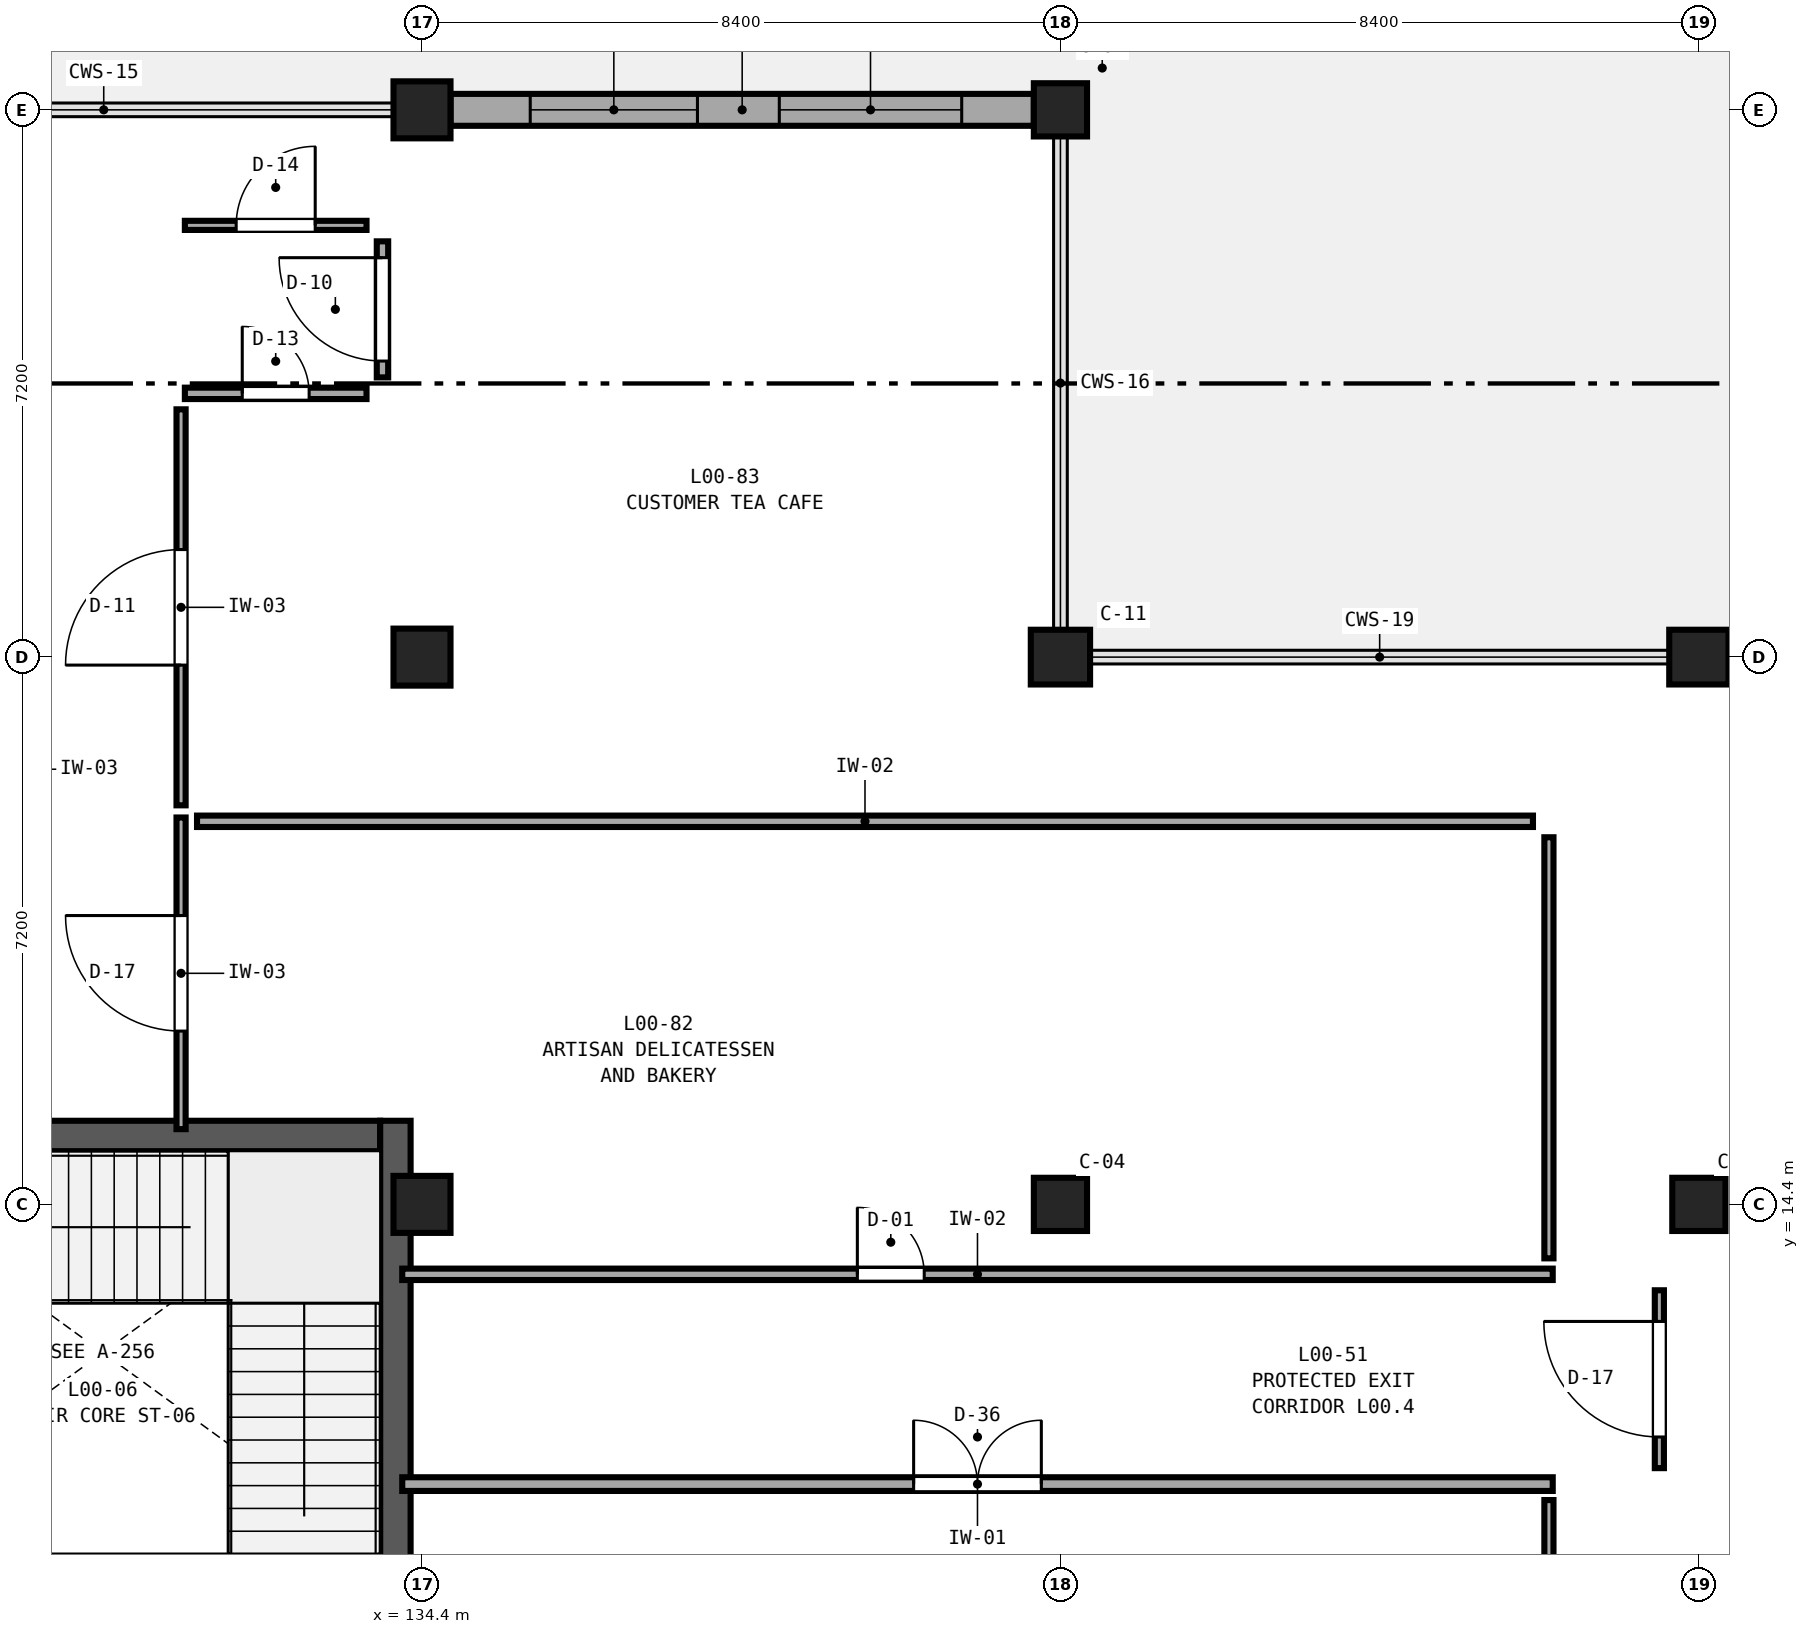
"""IFC4 building model, lengths in metres.
Left out: names, types, materials, properties, quantities, classifications, styles, units other than length and angle.
Written with IfcOpenShell. Run it as: python <this file> out.ifc"""

import sys

from ifc_helpers import new_model, si_unit, direction, frame, frame_2d, origin, origin_2d, place, context, subcontext, project, spatial, rectangle, extrude, element, fill, save


model = new_model("IFC4")
c1 = context("Model", 3, precision=1e-05, world=origin(), true_north=direction((0.0, 1.0)))
c2 = subcontext(c1, "Body", "Model", "MODEL_VIEW")
j1 = project(units=[si_unit("LENGTHUNIT", "METRE"), si_unit("PLANEANGLEUNIT", "RADIAN")], contexts=[c1])
p1 = place(None, origin())
s1 = spatial("IfcSite", under=j1, at=p1, CompositionType="ELEMENT")
p2 = place(p1, origin())
s2 = spatial("IfcBuilding", under=s1, at=p2, CompositionType="ELEMENT")
p3 = place(p2, origin())
s3 = spatial("IfcBuildingStorey", under=s2, at=p3, CompositionType="ELEMENT", Elevation=0.0)
for number, where, z_axis, x_axis in (
    (1, (134.4, 14.4, 0.0), (0.0, 0.0, 1.0), (1.0, 0.0, 0.0)),
    (2, (134.4, 21.6, 0.0), (0.0, 0.0, 1.0), (1.0, 0.0, 0.0)),
    (3, (134.4, 28.8, 0.0), (0.0, 0.0, 1.0), (1.0, 0.0, 0.0)),
):
    element("IfcColumn", number, at=place(p3, frame(where, z_axis=z_axis, x_axis=x_axis)), inside=s3, PredefinedType="COLUMN", context=c2, shape_type="SweptSolid", body=[
        extrude(rectangle(XDim=0.75, YDim=0.75, at=origin_2d()), origin(), (0.0, 0.0, 1.0), 5.4),
    ])
p4 = place(p3, frame((142.8, 14.4, 0.0), z_axis=(0.0, 0.0, 1.0), x_axis=(1.0, 0.0, 0.0)))
e4 = element("IfcColumn", 4, at=p4, inside=s3, PredefinedType="COLUMN", context=c2, shape_type="SweptSolid", body=[
    extrude(rectangle(XDim=0.7, YDim=0.7, at=origin_2d()), origin(), (0.0, 0.0, 1.0), 5.4),
])
p5 = place(p3, frame((142.8, 21.6, 0.0), z_axis=(0.0, 0.0, 1.0), x_axis=(1.0, 0.0, 0.0)))
e5 = element("IfcColumn", 5, at=p5, inside=s3, PredefinedType="PILASTER", context=c2, shape_type="SweptSolid", body=[
    extrude(rectangle(XDim=0.78, YDim=0.72, at=origin_2d()), origin(), (0.0, 0.0, 1.0), 5.4),
])
for number, where, z_axis, x_axis in (
    (6, (142.8, 28.8, 0.0), (0.0, 0.0, 1.0), (1.0, 0.0, 0.0)),
    (7, (151.2, 14.4, 0.0), (0.0, 0.0, 1.0), (1.0, 0.0, 0.0)),
):
    element("IfcColumn", number, at=place(p3, frame(where, z_axis=z_axis, x_axis=x_axis)), inside=s3, PredefinedType="COLUMN", context=c2, shape_type="SweptSolid", body=[
        extrude(rectangle(XDim=0.7, YDim=0.7, at=origin_2d()), origin(), (0.0, 0.0, 1.0), 5.4),
    ])
p6 = place(p3, frame((151.2, 21.6, 0.0), z_axis=(0.0, 0.0, 1.0), x_axis=(1.0, 0.0, 0.0)))
e8 = element("IfcColumn", 8, at=p6, inside=s3, PredefinedType="PILASTER", context=c2, shape_type="SweptSolid", body=[
    extrude(rectangle(XDim=0.78, YDim=0.72, at=origin_2d()), origin(), (0.0, 0.0, 1.0), 5.4),
])
p7 = place(p3, frame((134.775, 28.8, 0.0), z_axis=(0.0, 0.0, 1.0), x_axis=(1.0, 0.0, 0.0)))
e9 = element("IfcWall", 9, at=p7, inside=s3, PredefinedType="SOLIDWALL", context=c2, shape_type="SweptSolid", body=[
    extrude(rectangle(XDim=7.675, YDim=0.42, at=frame_2d((3.837, 0.0))), origin(), (0.0, 0.0, 1.0), 4.53),
])
p8 = place(p7, frame((1.049, 0.0, 0.75)))
e10 = element("IfcOpeningElement", 10, at=p8, cuts=e9, PredefinedType="OPENING", context=c2, shape_type="SweptSolid", body=[
    extrude(rectangle(XDim=2.2, YDim=2.8, at=frame_2d((1.1, 1.4))), frame((0.0, 0.23, 0.0), z_axis=(0.0, -1.0, 0.0), x_axis=(1.0, 0.0, 0.0)), (0.0, 0.0, 1.0), 0.46),
])
p9 = place(p7, frame((4.326, 0.0, 0.75)))
e11 = element("IfcOpeningElement", 11, at=p9, cuts=e9, PredefinedType="OPENING", context=c2, shape_type="SweptSolid", body=[
    extrude(rectangle(XDim=2.4, YDim=2.8, at=frame_2d((1.2, 1.4))), frame((0.0, 0.23, 0.0), z_axis=(0.0, -1.0, 0.0), x_axis=(1.0, 0.0, 0.0)), (0.0, 0.0, 1.0), 0.46),
])
p10 = place(p3, frame((126.55, 15.3, 0.0), z_axis=(0.0, 0.0, 1.0), x_axis=(1.0, 0.0, 0.0)))
e12 = element("IfcWall", 12, at=p10, inside=s3, PredefinedType="SHEAR", context=c2, shape_type="SweptSolid", body=[
    extrude(rectangle(XDim=7.3, YDim=0.4, at=frame_2d((3.65, 0.0))), origin(), (0.0, 0.0, 1.0), 5.4),
])
p11 = place(p3, frame((134.05, 7.25, 0.0), z_axis=(0.0, 0.0, 1.0), x_axis=(0.0, 1.0, 0.0)))
e13 = element("IfcWall", 13, at=p11, inside=s3, PredefinedType="SHEAR", context=c2, shape_type="SweptSolid", body=[
    extrude(rectangle(XDim=8.25, YDim=0.4, at=frame_2d((4.125, 0.0))), origin(), (0.0, 0.0, 1.0), 5.4),
])
p12 = place(p3, frame((134.14, 10.72, 0.0), z_axis=(0.0, 0.0, 1.0), x_axis=(1.0, 0.0, 0.0)))
e14 = element("IfcWall", 14, at=p12, inside=s3, PredefinedType="PARTITIONING", context=c2, shape_type="SweptSolid", body=[
    extrude(rectangle(XDim=15.137, YDim=0.18, at=frame_2d((7.569, 0.0))), origin(), (0.0, 0.0, 1.0), 5.08),
])
p13 = place(p12, frame((6.729, 0.0, 0.0)))
e15 = element("IfcOpeningElement", 15, at=p13, cuts=e14, PredefinedType="OPENING", context=c2, shape_type="SweptSolid", body=[
    extrude(rectangle(XDim=1.68, YDim=2.45, at=frame_2d((0.84, 1.225))), frame((0.0, 0.11, 0.0), z_axis=(0.0, -1.0, 0.0), x_axis=(1.0, 0.0, 0.0)), (0.0, 0.0, 1.0), 0.22),
])
p14 = place(p3, frame((134.14, 13.48, 0.0), z_axis=(0.0, 0.0, 1.0), x_axis=(1.0, 0.0, 0.0)))
e16 = element("IfcWall", 16, at=p14, inside=s3, PredefinedType="PARTITIONING", context=c2, shape_type="SweptSolid", body=[
    extrude(rectangle(XDim=15.137, YDim=0.15, at=frame_2d((7.569, 0.0))), origin(), (0.0, 0.0, 1.0), 5.08),
])
p15 = place(p14, frame((5.988, 0.0, 0.0)))
e17 = element("IfcOpeningElement", 17, at=p15, cuts=e16, PredefinedType="OPENING", context=c2, shape_type="SweptSolid", body=[
    extrude(rectangle(XDim=0.88, YDim=2.05, at=frame_2d((0.44, 1.025))), frame((0.0, 0.095, 0.0), z_axis=(0.0, -1.0, 0.0), x_axis=(1.0, 0.0, 0.0)), (0.0, 0.0, 1.0), 0.19),
])
p16 = place(p3, frame((131.23, 19.65, 0.0), z_axis=(0.0, 0.0, 1.0), x_axis=(0.0, 1.0, 0.0)))
e18 = element("IfcWall", 18, at=p16, inside=s3, PredefinedType="PARTITIONING", context=c2, shape_type="SweptSolid", body=[
    extrude(rectangle(XDim=5.21, YDim=0.12, at=frame_2d((2.605, 0.0))), origin(), (0.0, 0.0, 1.0), 5.08),
])
p17 = place(p16, frame((1.845, 0.0, 0.0)))
e19 = element("IfcOpeningElement", 19, at=p17, cuts=e18, PredefinedType="OPENING", context=c2, shape_type="SweptSolid", body=[
    extrude(rectangle(XDim=1.52, YDim=2.13, at=frame_2d((0.76, 1.065))), frame((0.0, 0.08, 0.0), z_axis=(0.0, -1.0, 0.0), x_axis=(1.0, 0.0, 0.0)), (0.0, 0.0, 1.0), 0.16),
])
p18 = place(p3, frame((131.23, 15.39, 0.0), z_axis=(0.0, 0.0, 1.0), x_axis=(0.0, 1.0, 0.0)))
e20 = element("IfcWall", 20, at=p18, inside=s3, PredefinedType="PARTITIONING", context=c2, shape_type="SweptSolid", body=[
    extrude(rectangle(XDim=4.1, YDim=0.12, at=frame_2d((2.05, 0.0))), origin(), (0.0, 0.0, 1.0), 5.08),
])
p19 = place(p18, frame((1.29, 0.0, 0.0)))
e21 = element("IfcOpeningElement", 21, at=p19, cuts=e20, PredefinedType="OPENING", context=c2, shape_type="SweptSolid", body=[
    extrude(rectangle(XDim=1.52, YDim=2.21, at=frame_2d((0.76, 1.105))), frame((0.0, 0.08, 0.0), z_axis=(0.0, -1.0, 0.0), x_axis=(1.0, 0.0, 0.0)), (0.0, 0.0, 1.0), 0.16),
])
p20 = place(p3, frame((131.28, 25.07, 0.0), z_axis=(0.0, 0.0, 1.0), x_axis=(1.0, 0.0, 0.0)))
e22 = element("IfcWall", 22, at=p20, inside=s3, PredefinedType="PARTITIONING", context=c2, shape_type="SweptSolid", body=[
    extrude(rectangle(XDim=2.39, YDim=0.15, at=frame_2d((1.195, 0.0))), origin(), (0.0, 0.0, 1.0), 5.08),
])
p21 = place(p20, frame((0.755, 0.0, 0.0)))
e23 = element("IfcOpeningElement", 23, at=p21, cuts=e22, PredefinedType="OPENING", context=c2, shape_type="SweptSolid", body=[
    extrude(rectangle(XDim=0.88, YDim=2.21, at=frame_2d((0.44, 1.105))), frame((0.0, 0.095, 0.0), z_axis=(0.0, -1.0, 0.0), x_axis=(1.0, 0.0, 0.0)), (0.0, 0.0, 1.0), 0.19),
])
p22 = place(p3, frame((131.28, 27.28, 0.0), z_axis=(0.0, 0.0, 1.0), x_axis=(1.0, 0.0, 0.0)))
e24 = element("IfcWall", 24, at=p22, inside=s3, PredefinedType="PARTITIONING", context=c2, shape_type="SweptSolid", body=[
    extrude(rectangle(XDim=2.39, YDim=0.12, at=frame_2d((1.195, 0.0))), origin(), (0.0, 0.0, 1.0), 5.08),
])
p23 = place(p22, frame((0.675, 0.0, 0.0)))
e25 = element("IfcOpeningElement", 25, at=p23, cuts=e24, PredefinedType="OPENING", context=c2, shape_type="SweptSolid", body=[
    extrude(rectangle(XDim=1.04, YDim=2.21, at=frame_2d((0.52, 1.105))), frame((0.0, 0.08, 0.0), z_axis=(0.0, -1.0, 0.0), x_axis=(1.0, 0.0, 0.0)), (0.0, 0.0, 1.0), 0.16),
])
p24 = place(p3, frame((150.68, 10.93, 0.0), z_axis=(0.0, 0.0, 1.0), x_axis=(0.0, 1.0, 0.0)))
e26 = element("IfcWall", 26, at=p24, inside=s3, PredefinedType="PARTITIONING", context=c2, shape_type="SweptSolid", body=[
    extrude(rectangle(XDim=2.34, YDim=0.12, at=frame_2d((1.17, 0.0))), origin(), (0.0, 0.0, 1.0), 4.58),
])
p25 = place(p24, frame((0.41, 0.0, 0.0)))
e27 = element("IfcOpeningElement", 27, at=p25, cuts=e26, PredefinedType="OPENING", context=c2, shape_type="SweptSolid", body=[
    extrude(rectangle(XDim=1.52, YDim=2.21, at=frame_2d((0.76, 1.105))), frame((0.0, 0.08, 0.0), z_axis=(0.0, -1.0, 0.0), x_axis=(1.0, 0.0, 0.0)), (0.0, 0.0, 1.0), 0.16),
])
p26 = place(p3, frame((133.88, 25.28, 0.0), z_axis=(0.0, 0.0, 1.0), x_axis=(0.0, 1.0, 0.0)))
e28 = element("IfcWall", 28, at=p26, inside=s3, PredefinedType="PARTITIONING", context=c2, shape_type="SweptSolid", body=[
    extrude(rectangle(XDim=1.79, YDim=0.15, at=frame_2d((0.895, 0.0))), origin(), (0.0, 0.0, 1.0), 4.58),
])
p27 = place(p26, frame((0.215, 0.0, 0.0)))
e29 = element("IfcOpeningElement", 29, at=p27, cuts=e28, PredefinedType="OPENING", context=c2, shape_type="SweptSolid", body=[
    extrude(rectangle(XDim=1.36, YDim=2.13, at=frame_2d((0.68, 1.065))), frame((0.0, 0.095, 0.0), z_axis=(0.0, -1.0, 0.0), x_axis=(1.0, 0.0, 0.0)), (0.0, 0.0, 1.0), 0.19),
])
p28 = place(p3, frame((131.44, 19.44, 0.0), z_axis=(0.0, 0.0, 1.0), x_axis=(1.0, 0.0, 0.0)))
e30 = element("IfcWall", 30, at=p28, inside=s3, PredefinedType="PARTITIONING", context=c2, shape_type="SweptSolid", body=[
    extrude(rectangle(XDim=17.577, YDim=0.15, at=frame_2d((8.789, 0.0))), origin(), (0.0, 0.0, 1.0), 5.08),
])
p29 = place(p3, frame((149.227, 0.37, 0.0), z_axis=(0.0, 0.0, 1.0), x_axis=(0.0, 1.0, 0.0)))
e31 = element("IfcWall", 31, at=p29, inside=s3, PredefinedType="PARTITIONING", context=c2, shape_type="SweptSolid", body=[
    extrude(rectangle(XDim=10.14, YDim=0.12, at=frame_2d((5.07, 0.0))), origin(), (0.0, 0.0, 1.0), 5.08),
])
p30 = place(p3, frame((149.227, 13.69, 0.0), z_axis=(0.0, 0.0, 1.0), x_axis=(0.0, 1.0, 0.0)))
e32 = element("IfcWall", 32, at=p30, inside=s3, PredefinedType="PARTITIONING", context=c2, shape_type="SweptSolid", body=[
    extrude(rectangle(XDim=5.54, YDim=0.12, at=frame_2d((2.77, 0.0))), origin(), (0.0, 0.0, 1.0), 5.08),
])
p31 = place(p8, origin())
e33 = element("IfcWindow", 33, at=p31, inside=s3, PartitioningType="TRIPLE_PANEL_VERTICAL", PredefinedType="WINDOW", context=c2, shape_type="SweptSolid", body=[
    extrude(rectangle(XDim=2.2, YDim=2.8, at=frame_2d((1.1, 1.4))), frame((0.0, 0.03, 0.0), z_axis=(0.0, -1.0, 0.0), x_axis=(1.0, 0.0, 0.0)), (0.0, 0.0, 1.0), 0.06),
])
fill(e10, e33)
p32 = place(p9, origin())
e34 = element("IfcWindow", 34, at=p32, inside=s3, PartitioningType="TRIPLE_PANEL_VERTICAL", PredefinedType="WINDOW", context=c2, shape_type="SweptSolid", body=[
    extrude(rectangle(XDim=2.4, YDim=2.8, at=frame_2d((1.2, 1.4))), frame((0.0, 0.03, 0.0), z_axis=(0.0, -1.0, 0.0), x_axis=(1.0, 0.0, 0.0)), (0.0, 0.0, 1.0), 0.06),
])
fill(e11, e34)
p33 = place(p13, frame((1.68, 0.0, 0.0), z_axis=(0.0, 0.0, 1.0), x_axis=(-1.0, 0.0, 0.0)))
e35 = element("IfcDoor", 35, at=p33, inside=s3, OperationType="DOUBLE_DOOR_SINGLE_SWING", PredefinedType="DOOR", context=c2, shape_type="SweptSolid", body=[
    extrude(rectangle(XDim=1.68, YDim=2.45, at=frame_2d((0.84, 1.225))), frame((0.0, 0.025, 0.0), z_axis=(0.0, -1.0, 0.0), x_axis=(1.0, 0.0, 0.0)), (0.0, 0.0, 1.0), 0.05),
])
fill(e15, e35)
p34 = place(p15, origin())
e36 = element("IfcDoor", 36, at=p34, inside=s3, OperationType="SINGLE_SWING_LEFT", PredefinedType="DOOR", context=c2, shape_type="SweptSolid", body=[
    extrude(rectangle(XDim=0.88, YDim=2.05, at=frame_2d((0.44, 1.025))), frame((0.0, 0.025, 0.0), z_axis=(0.0, -1.0, 0.0), x_axis=(1.0, 0.0, 0.0)), (0.0, 0.0, 1.0), 0.05),
])
fill(e17, e36)
p35 = place(p17, frame((1.52, 0.0, 0.0), z_axis=(0.0, 0.0, 1.0), x_axis=(-1.0, 0.0, 0.0)))
e37 = element("IfcDoor", 37, at=p35, inside=s3, OperationType="SINGLE_SWING_LEFT", PredefinedType="DOOR", context=c2, shape_type="SweptSolid", body=[
    extrude(rectangle(XDim=1.52, YDim=2.13, at=frame_2d((0.76, 1.065))), frame((0.0, 0.025, 0.0), z_axis=(0.0, -1.0, 0.0), x_axis=(1.0, 0.0, 0.0)), (0.0, 0.0, 1.0), 0.05),
])
fill(e19, e37)
p36 = place(p19, frame((1.52, 0.0, 0.0), z_axis=(0.0, 0.0, 1.0), x_axis=(-1.0, 0.0, 0.0)))
e38 = element("IfcDoor", 38, at=p36, inside=s3, OperationType="SINGLE_SWING_RIGHT", PredefinedType="DOOR", context=c2, shape_type="SweptSolid", body=[
    extrude(rectangle(XDim=1.52, YDim=2.21, at=frame_2d((0.76, 1.105))), frame((0.0, 0.025, 0.0), z_axis=(0.0, -1.0, 0.0), x_axis=(1.0, 0.0, 0.0)), (0.0, 0.0, 1.0), 0.05),
])
fill(e21, e38)
p37 = place(p21, frame((0.88, 0.0, 0.0), z_axis=(0.0, 0.0, 1.0), x_axis=(-1.0, 0.0, 0.0)))
e39 = element("IfcDoor", 39, at=p37, inside=s3, OperationType="SINGLE_SWING_LEFT", PredefinedType="DOOR", context=c2, shape_type="SweptSolid", body=[
    extrude(rectangle(XDim=0.88, YDim=2.21, at=frame_2d((0.44, 1.105))), frame((0.0, 0.025, 0.0), z_axis=(0.0, -1.0, 0.0), x_axis=(1.0, 0.0, 0.0)), (0.0, 0.0, 1.0), 0.05),
])
fill(e23, e39)
p38 = place(p23, origin())
e40 = element("IfcDoor", 40, at=p38, inside=s3, OperationType="SINGLE_SWING_RIGHT", PredefinedType="DOOR", context=c2, shape_type="SweptSolid", body=[
    extrude(rectangle(XDim=1.04, YDim=2.21, at=frame_2d((0.52, 1.105))), frame((0.0, 0.025, 0.0), z_axis=(0.0, -1.0, 0.0), x_axis=(1.0, 0.0, 0.0)), (0.0, 0.0, 1.0), 0.05),
])
fill(e25, e40)
p39 = place(p25, frame((1.52, 0.0, 0.0), z_axis=(0.0, 0.0, 1.0), x_axis=(-1.0, 0.0, 0.0)))
e41 = element("IfcDoor", 41, at=p39, inside=s3, OperationType="SINGLE_SWING_RIGHT", PredefinedType="DOOR", context=c2, shape_type="SweptSolid", body=[
    extrude(rectangle(XDim=1.52, YDim=2.21, at=frame_2d((0.76, 1.105))), frame((0.0, 0.025, 0.0), z_axis=(0.0, -1.0, 0.0), x_axis=(1.0, 0.0, 0.0)), (0.0, 0.0, 1.0), 0.05),
])
fill(e27, e41)
p40 = place(p27, frame((1.36, 0.0, 0.0), z_axis=(0.0, 0.0, 1.0), x_axis=(-1.0, 0.0, 0.0)))
e42 = element("IfcDoor", 42, at=p40, inside=s3, OperationType="SINGLE_SWING_RIGHT", PredefinedType="DOOR", context=c2, shape_type="SweptSolid", body=[
    extrude(rectangle(XDim=1.36, YDim=2.13, at=frame_2d((0.68, 1.065))), frame((0.0, 0.025, 0.0), z_axis=(0.0, -1.0, 0.0), x_axis=(1.0, 0.0, 0.0)), (0.0, 0.0, 1.0), 0.05),
])
fill(e29, e42)
save(model, sys.argv[1])
